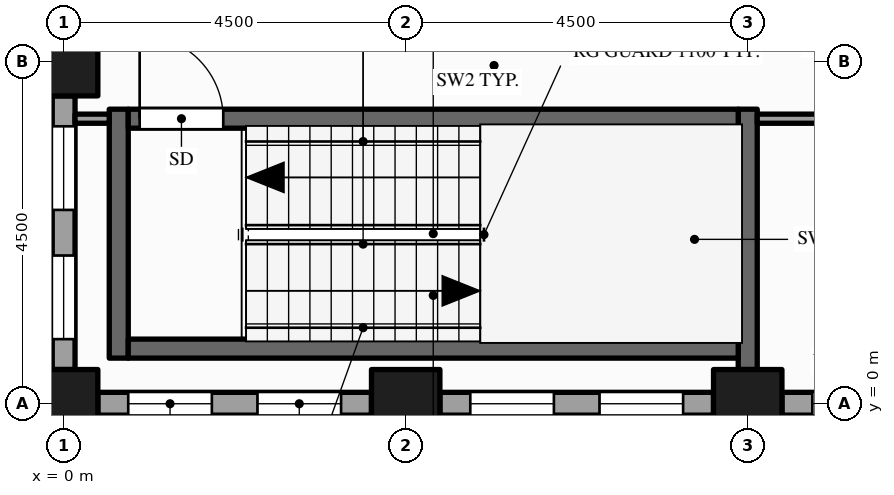
"""IFC4 building model, lengths in metres.
Left out: names, types, materials, properties, quantities, classifications, styles, units other than length and angle.
Written with IfcOpenShell. Run it as: python <this file> out.ifc"""

import sys

from ifc_helpers import new_model, si_unit, direction, frame, frame_2d, origin, origin_2d, place, context, subcontext, project, spatial, rectangle, hollow_rectangle, extrude, element, fill, save


model = new_model("IFC4")
c1 = context("Model", 3, precision=1e-05, world=origin(), true_north=direction((0.0, 1.0)))
c2 = subcontext(c1, "Body", "Model", "MODEL_VIEW")
j1 = project(units=[si_unit("LENGTHUNIT", "METRE"), si_unit("PLANEANGLEUNIT", "RADIAN")], contexts=[c1])
p1 = place(None, origin())
s1 = spatial("IfcSite", under=j1, at=p1, CompositionType="ELEMENT")
p2 = place(p1, origin())
s2 = spatial("IfcBuilding", under=s1, at=p2, CompositionType="ELEMENT")
p3 = place(p2, frame((0.0, 0.0, 151.0)))
s3 = spatial("IfcBuildingStorey", under=s2, at=p3, CompositionType="ELEMENT", Elevation=151.0)
for number, where, z_axis, x_axis in (
    (1, (0.0, 0.0, -0.15), (0.0, 0.0, 1.0), (1.0, 0.0, 0.0)),
    (2, (0.0, 4.5, -0.15), (0.0, 0.0, 1.0), (1.0, 0.0, 0.0)),
    (3, (4.5, 0.0, -0.15), (0.0, 0.0, 1.0), (1.0, 0.0, 0.0)),
    (4, (9.0, 0.0, -0.15), (0.0, 0.0, 1.0), (1.0, 0.0, 0.0)),
):
    element("IfcColumn", number, at=place(p3, frame(where, z_axis=z_axis, x_axis=x_axis)), inside=s3, PredefinedType="COLUMN", context=c2, shape_type="SweptSolid", body=[
        extrude(hollow_rectangle(XDim=0.9, YDim=0.9, WallThickness=0.045, at=origin_2d()), origin(), (0.0, 0.0, 1.0), 4.0),
    ])
p4 = place(p3, frame((0.45, 0.0, 0.0), z_axis=(0.0, 0.0, 1.0), x_axis=(1.0, 0.0, 0.0)))
e5 = element("IfcWall", 5, at=p4, inside=s3, PredefinedType="STANDARD", context=c2, shape_type="SweptSolid", body=[
    extrude(rectangle(XDim=3.6, YDim=0.3, at=frame_2d((1.8, 0.0))), origin(), (0.0, 0.0, 1.0), 3.149),
])
p5 = place(p4, frame((0.4, 0.0, 0.9)))
e6 = element("IfcOpeningElement", 6, at=p5, cuts=e5, PredefinedType="OPENING", context=c2, shape_type="SweptSolid", body=[
    extrude(rectangle(XDim=1.1, YDim=2.0, at=frame_2d((0.55, 1.0))), frame((0.0, 0.16, 0.0), z_axis=(0.0, -1.0, 0.0), x_axis=(1.0, 0.0, 0.0)), (0.0, 0.0, 1.0), 0.32),
])
p6 = place(p4, frame((2.1, 0.0, 0.9)))
e7 = element("IfcOpeningElement", 7, at=p6, cuts=e5, PredefinedType="OPENING", context=c2, shape_type="SweptSolid", body=[
    extrude(rectangle(XDim=1.1, YDim=2.0, at=frame_2d((0.55, 1.0))), frame((0.0, 0.16, 0.0), z_axis=(0.0, -1.0, 0.0), x_axis=(1.0, 0.0, 0.0)), (0.0, 0.0, 1.0), 0.32),
])
p7 = place(p3, frame((4.95, 0.0, 0.0), z_axis=(0.0, 0.0, 1.0), x_axis=(1.0, 0.0, 0.0)))
e8 = element("IfcWall", 8, at=p7, inside=s3, PredefinedType="STANDARD", context=c2, shape_type="SweptSolid", body=[
    extrude(rectangle(XDim=3.6, YDim=0.3, at=frame_2d((1.8, 0.0))), origin(), (0.0, 0.0, 1.0), 3.149),
])
p8 = place(p7, frame((0.4, 0.0, 0.9)))
e9 = element("IfcOpeningElement", 9, at=p8, cuts=e8, PredefinedType="OPENING", context=c2, shape_type="SweptSolid", body=[
    extrude(rectangle(XDim=1.1, YDim=2.0, at=frame_2d((0.55, 1.0))), frame((0.0, 0.16, 0.0), z_axis=(0.0, -1.0, 0.0), x_axis=(1.0, 0.0, 0.0)), (0.0, 0.0, 1.0), 0.32),
])
p9 = place(p7, frame((2.1, 0.0, 0.9)))
e10 = element("IfcOpeningElement", 10, at=p9, cuts=e8, PredefinedType="OPENING", context=c2, shape_type="SweptSolid", body=[
    extrude(rectangle(XDim=1.1, YDim=2.0, at=frame_2d((0.55, 1.0))), frame((0.0, 0.16, 0.0), z_axis=(0.0, -1.0, 0.0), x_axis=(1.0, 0.0, 0.0)), (0.0, 0.0, 1.0), 0.32),
])
p10 = place(p3, frame((9.45, 0.0, 0.0), z_axis=(0.0, 0.0, 1.0), x_axis=(1.0, 0.0, 0.0)))
e11 = element("IfcWall", 11, at=p10, inside=s3, PredefinedType="STANDARD", context=c2, shape_type="SweptSolid", body=[
    extrude(rectangle(XDim=3.6, YDim=0.3, at=frame_2d((1.8, 0.0))), origin(), (0.0, 0.0, 1.0), 2.87),
])
p11 = place(p10, frame((0.4, 0.0, 0.9)))
e12 = element("IfcOpeningElement", 12, at=p11, cuts=e11, PredefinedType="OPENING", context=c2, shape_type="SweptSolid", body=[
    extrude(rectangle(XDim=1.1, YDim=1.75, at=frame_2d((0.55, 0.875))), frame((0.0, 0.16, 0.0), z_axis=(0.0, -1.0, 0.0), x_axis=(1.0, 0.0, 0.0)), (0.0, 0.0, 1.0), 0.32),
])
p12 = place(p10, frame((2.1, 0.0, 0.9)))
e13 = element("IfcOpeningElement", 13, at=p12, cuts=e11, PredefinedType="OPENING", context=c2, shape_type="SweptSolid", body=[
    extrude(rectangle(XDim=1.1, YDim=1.75, at=frame_2d((0.55, 0.875))), frame((0.0, 0.16, 0.0), z_axis=(0.0, -1.0, 0.0), x_axis=(1.0, 0.0, 0.0)), (0.0, 0.0, 1.0), 0.32),
])
p13 = place(p3, frame((0.0, 4.05, 0.0), z_axis=(0.0, 0.0, 1.0), x_axis=(0.0, -1.0, 0.0)))
e14 = element("IfcWall", 14, at=p13, inside=s3, PredefinedType="STANDARD", context=c2, shape_type="SweptSolid", body=[
    extrude(rectangle(XDim=3.6, YDim=0.3, at=frame_2d((1.8, 0.0))), origin(), (0.0, 0.0, 1.0), 3.149),
])
p14 = place(p13, frame((0.4, 0.0, 0.9)))
e15 = element("IfcOpeningElement", 15, at=p14, cuts=e14, PredefinedType="OPENING", context=c2, shape_type="SweptSolid", body=[
    extrude(rectangle(XDim=1.1, YDim=2.0, at=frame_2d((0.55, 1.0))), frame((0.0, 0.16, 0.0), z_axis=(0.0, -1.0, 0.0), x_axis=(1.0, 0.0, 0.0)), (0.0, 0.0, 1.0), 0.32),
])
p15 = place(p13, frame((2.1, 0.0, 0.9)))
e16 = element("IfcOpeningElement", 16, at=p15, cuts=e14, PredefinedType="OPENING", context=c2, shape_type="SweptSolid", body=[
    extrude(rectangle(XDim=1.1, YDim=2.0, at=frame_2d((0.55, 1.0))), frame((0.0, 0.16, 0.0), z_axis=(0.0, -1.0, 0.0), x_axis=(1.0, 0.0, 0.0)), (0.0, 0.0, 1.0), 0.32),
])
p16 = place(p3, frame((0.725, 0.6, 0.0), z_axis=(0.0, 0.0, 1.0), x_axis=(0.0, 1.0, 0.0)))
e17 = element("IfcWall", 17, at=p16, inside=s3, PredefinedType="SHEAR", context=c2, shape_type="SweptSolid", body=[
    extrude(rectangle(XDim=3.275, YDim=0.25, at=frame_2d((1.637, 0.0))), origin(), (0.0, 0.0, 1.0), 3.85),
])
p17 = place(p3, frame((9.0, 0.45, 0.0), z_axis=(0.0, 0.0, 1.0), x_axis=(0.0, 1.0, 0.0)))
e18 = element("IfcWall", 18, at=p17, inside=s3, PredefinedType="SHEAR", context=c2, shape_type="SweptSolid", body=[
    extrude(rectangle(XDim=3.425, YDim=0.25, at=frame_2d((1.712, 0.0))), origin(), (0.0, 0.0, 1.0), 3.85),
])
p18 = place(p3, frame((0.85, 0.725, 0.0), z_axis=(0.0, 0.0, 1.0), x_axis=(1.0, 0.0, 0.0)))
e19 = element("IfcWall", 19, at=p18, inside=s3, PredefinedType="SHEAR", context=c2, shape_type="SweptSolid", body=[
    extrude(rectangle(XDim=8.025, YDim=0.25, at=frame_2d((4.012, 0.0))), origin(), (0.0, 0.0, 1.0), 3.85),
])
p19 = place(p3, frame((0.15, 3.75, 0.0), z_axis=(0.0, 0.0, 1.0), x_axis=(1.0, 0.0, 0.0)))
e20 = element("IfcWall", 20, at=p19, inside=s3, PredefinedType="PARTITIONING", context=c2, shape_type="SweptSolid", body=[
    extrude(rectangle(XDim=0.45, YDim=0.12, at=frame_2d((0.225, 0.0))), origin(), (0.0, 0.0, 1.0), 3.85),
])
p20 = place(p3, frame((0.85, 3.75, 0.0), z_axis=(0.0, 0.0, 1.0), x_axis=(1.0, 0.0, 0.0)))
e21 = element("IfcWall", 21, at=p20, inside=s3, PredefinedType="SHEAR", context=c2, shape_type="SweptSolid", body=[
    extrude(rectangle(XDim=8.025, YDim=0.25, at=frame_2d((4.012, 0.0))), origin(), (0.0, 0.0, 1.0), 3.85),
])
p21 = place(p20, frame((0.15, 0.0, 0.0)))
e22 = element("IfcOpeningElement", 22, at=p21, cuts=e21, PredefinedType="OPENING", context=c2, shape_type="SweptSolid", body=[
    extrude(rectangle(XDim=1.1, YDim=2.1, at=frame_2d((0.55, 1.05))), frame((0.0, 0.135, 0.0), z_axis=(0.0, -1.0, 0.0), x_axis=(1.0, 0.0, 0.0)), (0.0, 0.0, 1.0), 0.27),
])
p22 = place(p3, frame((9.125, 3.75, 0.0), z_axis=(0.0, 0.0, 1.0), x_axis=(1.0, 0.0, 0.0)))
e23 = element("IfcWall", 23, at=p22, inside=s3, PredefinedType="PARTITIONING", context=c2, shape_type="SweptSolid", body=[
    extrude(rectangle(XDim=2.065, YDim=0.12, at=frame_2d((1.032, 0.0))), origin(), (0.0, 0.0, 1.0), 2.87),
])
p23 = place(p5, origin())
e24 = element("IfcWindow", 24, at=p23, inside=s3, PartitioningType="SINGLE_PANEL", PredefinedType="WINDOW", context=c2, shape_type="SweptSolid", body=[
    extrude(rectangle(XDim=1.1, YDim=2.0, at=frame_2d((0.55, 1.0))), frame((0.0, 0.03, 0.0), z_axis=(0.0, -1.0, 0.0), x_axis=(1.0, 0.0, 0.0)), (0.0, 0.0, 1.0), 0.06),
])
fill(e6, e24)
p24 = place(p6, origin())
e25 = element("IfcWindow", 25, at=p24, inside=s3, PartitioningType="SINGLE_PANEL", PredefinedType="WINDOW", context=c2, shape_type="SweptSolid", body=[
    extrude(rectangle(XDim=1.1, YDim=2.0, at=frame_2d((0.55, 1.0))), frame((0.0, 0.03, 0.0), z_axis=(0.0, -1.0, 0.0), x_axis=(1.0, 0.0, 0.0)), (0.0, 0.0, 1.0), 0.06),
])
fill(e7, e25)
p25 = place(p8, origin())
e26 = element("IfcWindow", 26, at=p25, inside=s3, PartitioningType="SINGLE_PANEL", PredefinedType="WINDOW", context=c2, shape_type="SweptSolid", body=[
    extrude(rectangle(XDim=1.1, YDim=2.0, at=frame_2d((0.55, 1.0))), frame((0.0, 0.03, 0.0), z_axis=(0.0, -1.0, 0.0), x_axis=(1.0, 0.0, 0.0)), (0.0, 0.0, 1.0), 0.06),
])
fill(e9, e26)
p26 = place(p9, origin())
e27 = element("IfcWindow", 27, at=p26, inside=s3, PartitioningType="SINGLE_PANEL", PredefinedType="WINDOW", context=c2, shape_type="SweptSolid", body=[
    extrude(rectangle(XDim=1.1, YDim=2.0, at=frame_2d((0.55, 1.0))), frame((0.0, 0.03, 0.0), z_axis=(0.0, -1.0, 0.0), x_axis=(1.0, 0.0, 0.0)), (0.0, 0.0, 1.0), 0.06),
])
fill(e10, e27)
p27 = place(p11, origin())
e28 = element("IfcWindow", 28, at=p27, inside=s3, PartitioningType="SINGLE_PANEL", PredefinedType="WINDOW", context=c2, shape_type="SweptSolid", body=[
    extrude(rectangle(XDim=1.1, YDim=1.75, at=frame_2d((0.55, 0.875))), frame((0.0, 0.03, 0.0), z_axis=(0.0, -1.0, 0.0), x_axis=(1.0, 0.0, 0.0)), (0.0, 0.0, 1.0), 0.06),
])
fill(e12, e28)
p28 = place(p14, origin())
e29 = element("IfcWindow", 29, at=p28, inside=s3, PartitioningType="SINGLE_PANEL", PredefinedType="WINDOW", context=c2, shape_type="SweptSolid", body=[
    extrude(rectangle(XDim=1.1, YDim=2.0, at=frame_2d((0.55, 1.0))), frame((0.0, 0.03, 0.0), z_axis=(0.0, -1.0, 0.0), x_axis=(1.0, 0.0, 0.0)), (0.0, 0.0, 1.0), 0.06),
])
fill(e15, e29)
p29 = place(p15, origin())
e30 = element("IfcWindow", 30, at=p29, inside=s3, PartitioningType="SINGLE_PANEL", PredefinedType="WINDOW", context=c2, shape_type="SweptSolid", body=[
    extrude(rectangle(XDim=1.1, YDim=2.0, at=frame_2d((0.55, 1.0))), frame((0.0, 0.03, 0.0), z_axis=(0.0, -1.0, 0.0), x_axis=(1.0, 0.0, 0.0)), (0.0, 0.0, 1.0), 0.06),
])
fill(e16, e30)
p30 = place(p21, origin())
e31 = element("IfcDoor", 31, at=p30, inside=s3, OperationType="SINGLE_SWING_LEFT", PredefinedType="DOOR", context=c2, shape_type="SweptSolid", body=[
    extrude(rectangle(XDim=1.1, YDim=2.1, at=frame_2d((0.55, 1.05))), frame((0.0, 0.025, 0.0), z_axis=(0.0, -1.0, 0.0), x_axis=(1.0, 0.0, 0.0)), (0.0, 0.0, 1.0), 0.05),
])
fill(e22, e31)
save(model, sys.argv[1])
